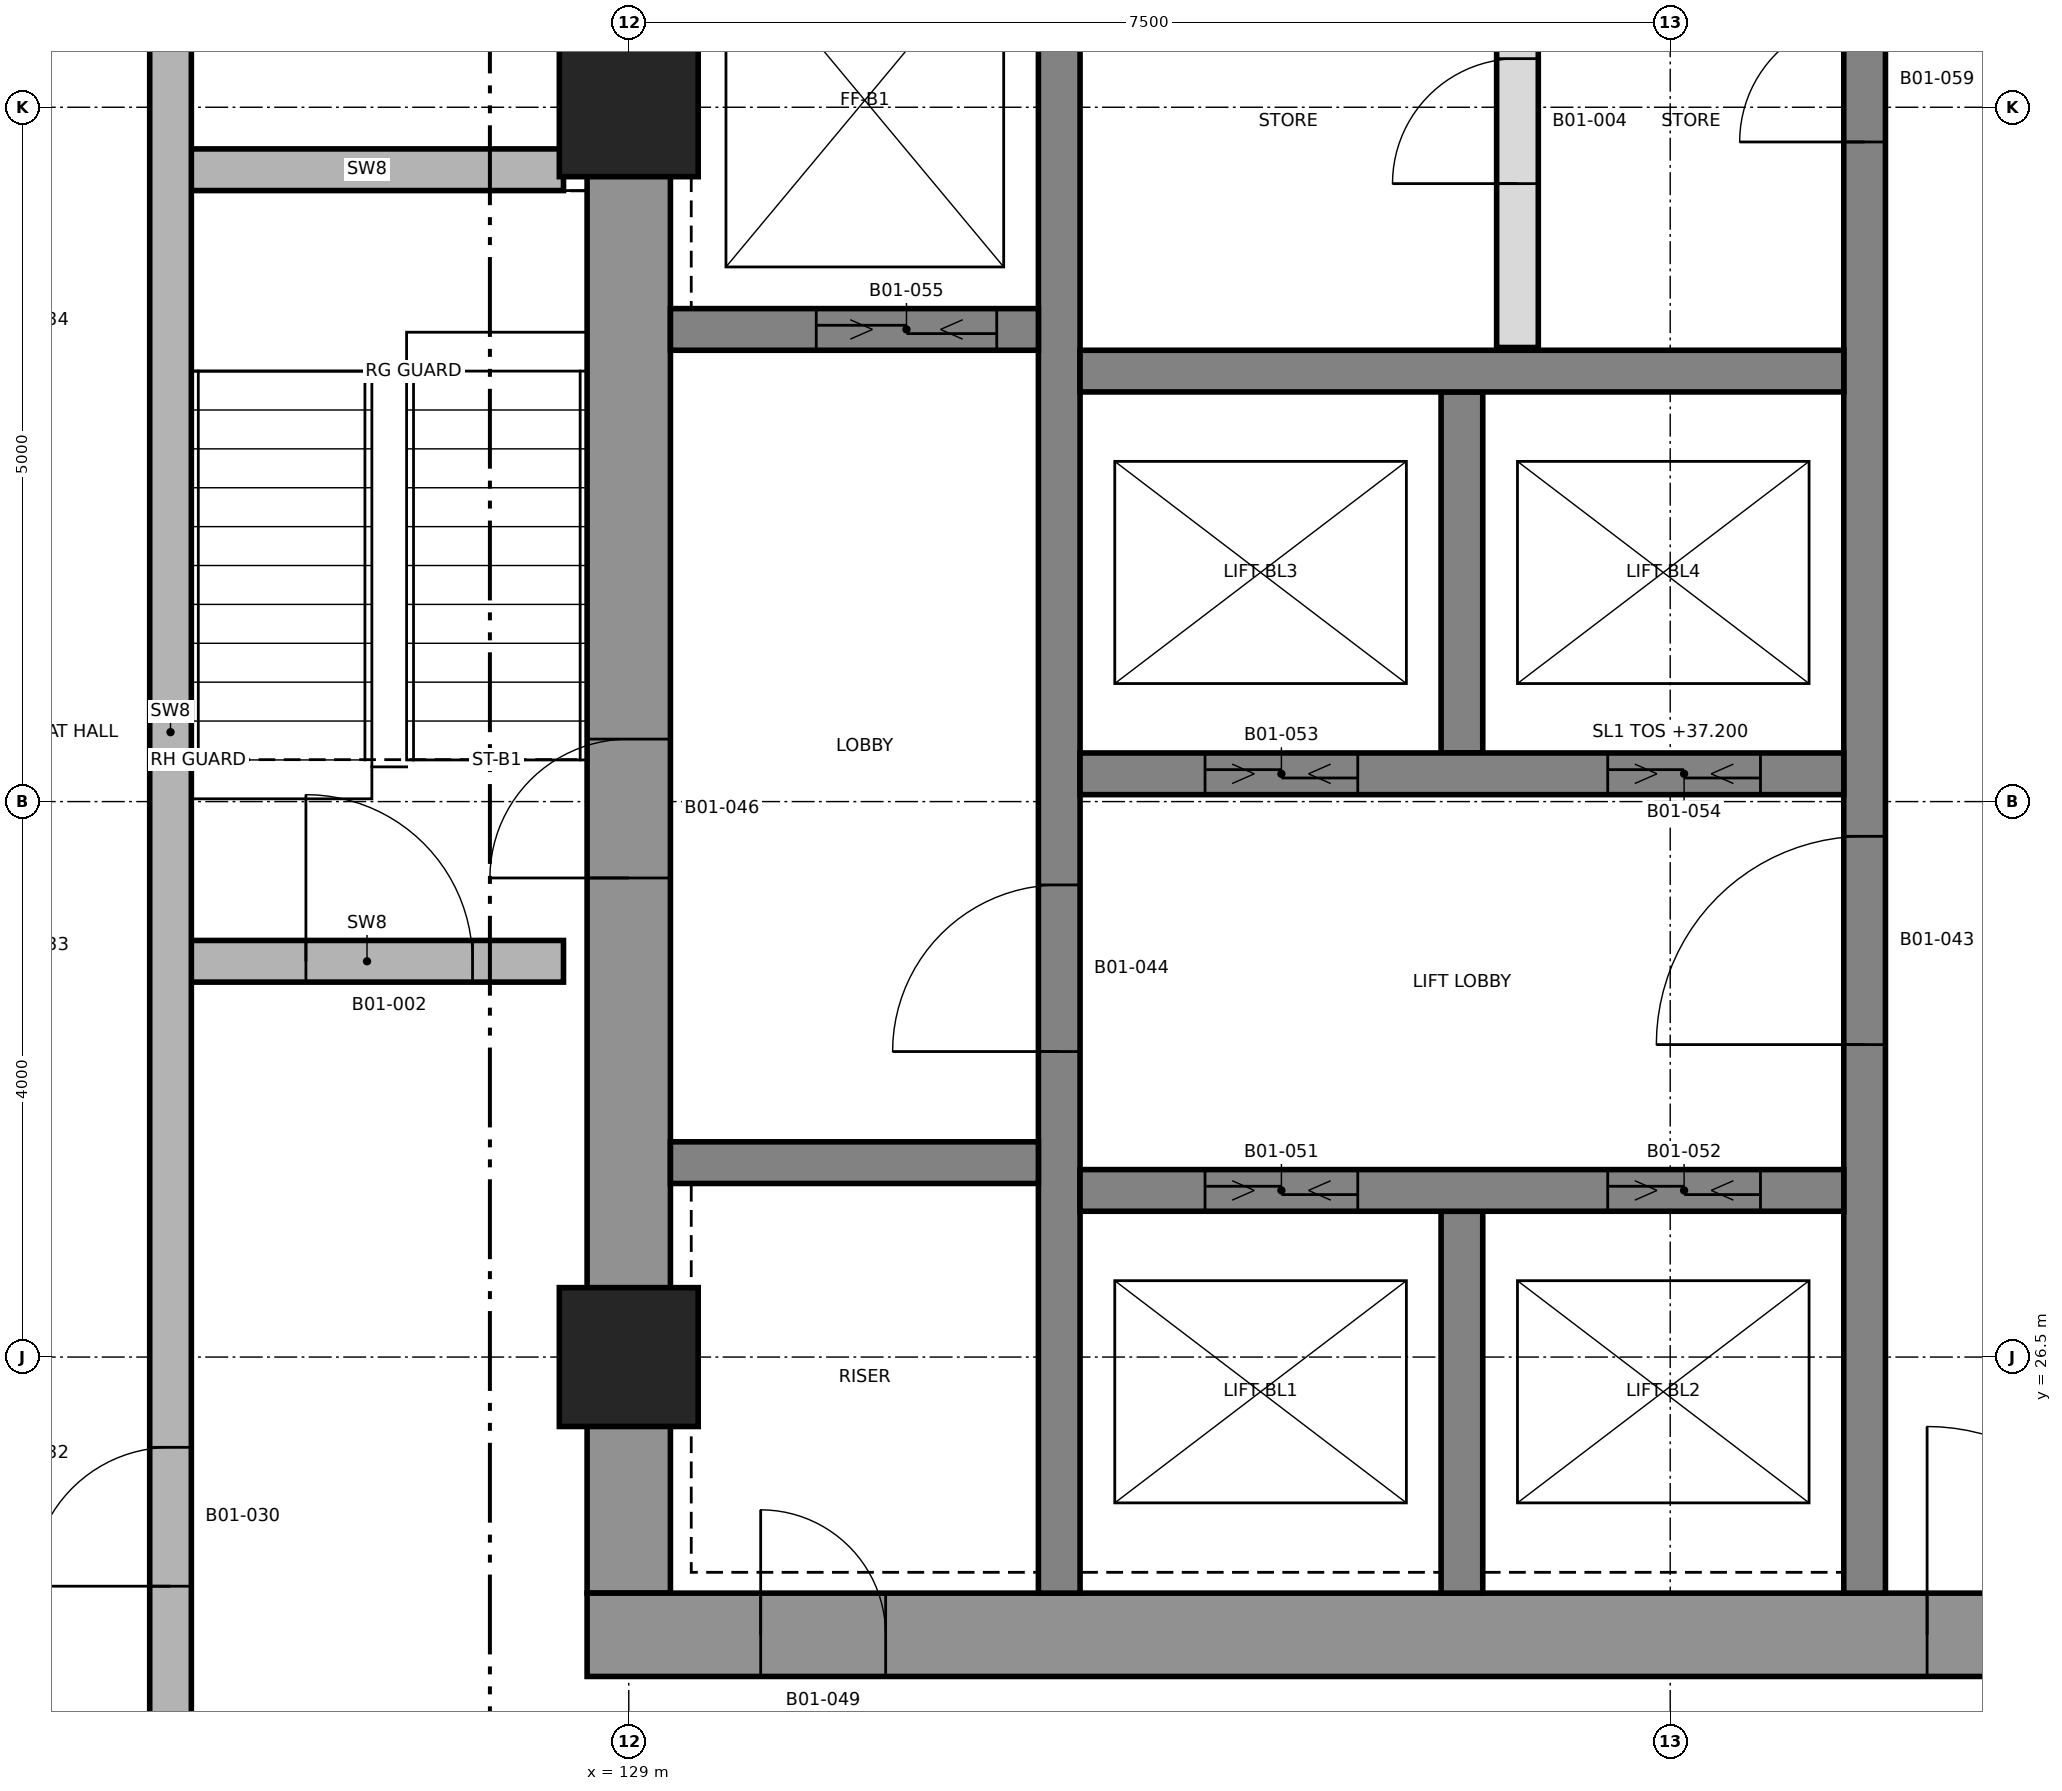
"""IFC4 building model, lengths in metres.
Left out: names, types, materials, properties, quantities, classifications, styles, units other than length and angle.
Written with IfcOpenShell. Run it as: python <this file> out.ifc"""

import sys

from ifc_helpers import new_model, si_unit, direction, frame, frame_2d, origin, origin_2d, place, context, subcontext, project, spatial, rectangle, extrude, element, fill, save


model = new_model("IFC4")
c1 = context("Model", 3, precision=1e-05, world=origin(), true_north=direction((0.0, 1.0)))
c2 = subcontext(c1, "Body", "Model", "MODEL_VIEW")
j1 = project(units=[si_unit("LENGTHUNIT", "METRE"), si_unit("PLANEANGLEUNIT", "RADIAN")], contexts=[c1])
p1 = place(None, origin())
s1 = spatial("IfcSite", under=j1, at=p1, CompositionType="ELEMENT")
p2 = place(p1, origin())
s2 = spatial("IfcBuilding", under=s1, at=p2, CompositionType="ELEMENT")
p3 = place(p2, frame((0.0, 0.0, 37.2)))
s3 = spatial("IfcBuildingStorey", under=s2, at=p3, CompositionType="ELEMENT", Elevation=37.2)
p4 = place(p3, frame((129.0, 24.8, 0.0), z_axis=(0.0, 0.0, 1.0), x_axis=(0.0, 1.0, 0.0)))
e1 = element("IfcWall", 1, at=p4, inside=s3, PredefinedType="SHEAR", context=c2, shape_type="SweptSolid", body=[
    extrude(rectangle(XDim=12.4, YDim=0.6, at=frame_2d((6.2, 0.0))), origin(), (0.0, 0.0, 1.0), 3.7),
])
p5 = place(p4, frame((5.15, 0.0, 0.0)))
e2 = element("IfcOpeningElement", 2, at=p5, cuts=e1, PredefinedType="OPENING", context=c2, shape_type="SweptSolid", body=[
    extrude(rectangle(XDim=1.0, YDim=2.1, at=frame_2d((0.5, 1.05))), frame((0.0, 0.31, 0.0), z_axis=(0.0, -1.0, 0.0), x_axis=(1.0, 0.0, 0.0)), (0.0, 0.0, 1.0), 0.62),
])
p6 = place(p3, frame((128.7, 24.5, 0.0), z_axis=(0.0, 0.0, 1.0), x_axis=(1.0, 0.0, 0.0)))
e3 = element("IfcWall", 3, at=p6, inside=s3, PredefinedType="SHEAR", context=c2, shape_type="SweptSolid", body=[
    extrude(rectangle(XDim=15.0, YDim=0.6, at=frame_2d((7.5, 0.0))), origin(), (0.0, 0.0, 1.0), 3.7),
])
p7 = place(p6, frame((9.65, 0.0, 0.0)))
e4 = element("IfcOpeningElement", 4, at=p7, cuts=e3, PredefinedType="OPENING", context=c2, shape_type="SweptSolid", body=[
    extrude(rectangle(XDim=1.5, YDim=2.1, at=frame_2d((0.75, 1.05))), frame((0.0, 0.31, 0.0), z_axis=(0.0, -1.0, 0.0), x_axis=(1.0, 0.0, 0.0)), (0.0, 0.0, 1.0), 0.62),
])
p8 = place(p6, frame((1.25, 0.0, 0.0)))
e5 = element("IfcOpeningElement", 5, at=p8, cuts=e3, PredefinedType="OPENING", context=c2, shape_type="SweptSolid", body=[
    extrude(rectangle(XDim=0.9, YDim=2.1, at=frame_2d((0.45, 1.05))), frame((0.0, 0.31, 0.0), z_axis=(0.0, -1.0, 0.0), x_axis=(1.0, 0.0, 0.0)), (0.0, 0.0, 1.0), 0.62),
])
p9 = place(p3, frame((132.1, 24.8, 0.0), z_axis=(0.0, 0.0, 1.0), x_axis=(0.0, 1.0, 0.0)))
e6 = element("IfcWall", 6, at=p9, inside=s3, PredefinedType="SHEAR", context=c2, shape_type="SweptSolid", body=[
    extrude(rectangle(XDim=12.4, YDim=0.3, at=frame_2d((6.2, 0.0))), origin(), (0.0, 0.0, 1.0), 3.7),
])
p10 = place(p9, frame((3.9, 0.0, 0.0)))
e7 = element("IfcOpeningElement", 7, at=p10, cuts=e6, PredefinedType="OPENING", context=c2, shape_type="SweptSolid", body=[
    extrude(rectangle(XDim=1.2, YDim=2.1, at=frame_2d((0.6, 1.05))), frame((0.0, 0.16, 0.0), z_axis=(0.0, -1.0, 0.0), x_axis=(1.0, 0.0, 0.0)), (0.0, 0.0, 1.0), 0.32),
])
p11 = place(p3, frame((137.9, 24.8, 0.0), z_axis=(0.0, 0.0, 1.0), x_axis=(0.0, 1.0, 0.0)))
e8 = element("IfcWall", 8, at=p11, inside=s3, PredefinedType="SHEAR", context=c2, shape_type="SweptSolid", body=[
    extrude(rectangle(XDim=12.4, YDim=0.3, at=frame_2d((6.2, 0.0))), origin(), (0.0, 0.0, 1.0), 3.7),
])
p12 = place(p11, frame((3.95, 0.0, 0.0)))
e9 = element("IfcOpeningElement", 9, at=p12, cuts=e8, PredefinedType="OPENING", context=c2, shape_type="SweptSolid", body=[
    extrude(rectangle(XDim=1.5, YDim=2.1, at=frame_2d((0.75, 1.05))), frame((0.0, 0.16, 0.0), z_axis=(0.0, -1.0, 0.0), x_axis=(1.0, 0.0, 0.0)), (0.0, 0.0, 1.0), 0.32),
])
p13 = place(p11, frame((10.45, 0.0, 0.0)))
e10 = element("IfcOpeningElement", 10, at=p13, cuts=e8, PredefinedType="OPENING", context=c2, shape_type="SweptSolid", body=[
    extrude(rectangle(XDim=0.9, YDim=2.1, at=frame_2d((0.45, 1.05))), frame((0.0, 0.16, 0.0), z_axis=(0.0, -1.0, 0.0), x_axis=(1.0, 0.0, 0.0)), (0.0, 0.0, 1.0), 0.32),
])
p14 = place(p3, frame((135.0, 24.8, 0.0), z_axis=(0.0, 0.0, 1.0), x_axis=(0.0, 1.0, 0.0)))
e11 = element("IfcWall", 11, at=p14, inside=s3, PredefinedType="SHEAR", context=c2, shape_type="SweptSolid", body=[
    extrude(rectangle(XDim=2.75, YDim=0.3, at=frame_2d((1.375, 0.0))), origin(), (0.0, 0.0, 1.0), 3.7),
])
p15 = place(p3, frame((135.0, 30.85, 0.0), z_axis=(0.0, 0.0, 1.0), x_axis=(0.0, 1.0, 0.0)))
e12 = element("IfcWall", 12, at=p15, inside=s3, PredefinedType="SHEAR", context=c2, shape_type="SweptSolid", body=[
    extrude(rectangle(XDim=2.6, YDim=0.3, at=frame_2d((1.3, 0.0))), origin(), (0.0, 0.0, 1.0), 3.7),
])
p16 = place(p3, frame((132.25, 27.7, 0.0), z_axis=(0.0, 0.0, 1.0), x_axis=(1.0, 0.0, 0.0)))
e13 = element("IfcWall", 13, at=p16, inside=s3, PredefinedType="SHEAR", context=c2, shape_type="SweptSolid", body=[
    extrude(rectangle(XDim=5.5, YDim=0.3, at=frame_2d((2.75, 0.0))), origin(), (0.0, 0.0, 1.0), 3.7),
])
p17 = place(p16, frame((0.9, 0.0, 0.0)))
e14 = element("IfcOpeningElement", 14, at=p17, cuts=e13, PredefinedType="OPENING", context=c2, shape_type="SweptSolid", body=[
    extrude(rectangle(XDim=1.1, YDim=2.4, at=frame_2d((0.55, 1.2))), frame((0.0, 0.16, 0.0), z_axis=(0.0, -1.0, 0.0), x_axis=(1.0, 0.0, 0.0)), (0.0, 0.0, 1.0), 0.32),
])
p18 = place(p16, frame((3.8, 0.0, 0.0)))
e15 = element("IfcOpeningElement", 15, at=p18, cuts=e13, PredefinedType="OPENING", context=c2, shape_type="SweptSolid", body=[
    extrude(rectangle(XDim=1.1, YDim=2.4, at=frame_2d((0.55, 1.2))), frame((0.0, 0.16, 0.0), z_axis=(0.0, -1.0, 0.0), x_axis=(1.0, 0.0, 0.0)), (0.0, 0.0, 1.0), 0.32),
])
p19 = place(p3, frame((132.25, 30.7, 0.0), z_axis=(0.0, 0.0, 1.0), x_axis=(1.0, 0.0, 0.0)))
e16 = element("IfcWall", 16, at=p19, inside=s3, PredefinedType="SHEAR", context=c2, shape_type="SweptSolid", body=[
    extrude(rectangle(XDim=5.5, YDim=0.3, at=frame_2d((2.75, 0.0))), origin(), (0.0, 0.0, 1.0), 3.7),
])
p20 = place(p19, frame((0.9, 0.0, 0.0)))
e17 = element("IfcOpeningElement", 17, at=p20, cuts=e16, PredefinedType="OPENING", context=c2, shape_type="SweptSolid", body=[
    extrude(rectangle(XDim=1.1, YDim=2.4, at=frame_2d((0.55, 1.2))), frame((0.0, 0.16, 0.0), z_axis=(0.0, -1.0, 0.0), x_axis=(1.0, 0.0, 0.0)), (0.0, 0.0, 1.0), 0.32),
])
p21 = place(p19, frame((3.8, 0.0, 0.0)))
e18 = element("IfcOpeningElement", 18, at=p21, cuts=e16, PredefinedType="OPENING", context=c2, shape_type="SweptSolid", body=[
    extrude(rectangle(XDim=1.1, YDim=2.4, at=frame_2d((0.55, 1.2))), frame((0.0, 0.16, 0.0), z_axis=(0.0, -1.0, 0.0), x_axis=(1.0, 0.0, 0.0)), (0.0, 0.0, 1.0), 0.32),
])
p22 = place(p3, frame((132.25, 33.6, 0.0), z_axis=(0.0, 0.0, 1.0), x_axis=(1.0, 0.0, 0.0)))
e19 = element("IfcWall", 19, at=p22, inside=s3, PredefinedType="SHEAR", context=c2, shape_type="SweptSolid", body=[
    extrude(rectangle(XDim=5.5, YDim=0.3, at=frame_2d((2.75, 0.0))), origin(), (0.0, 0.0, 1.0), 3.7),
])
p23 = place(p3, frame((129.3, 27.9, 0.0), z_axis=(0.0, 0.0, 1.0), x_axis=(1.0, 0.0, 0.0)))
e20 = element("IfcWall", 20, at=p23, inside=s3, PredefinedType="SHEAR", context=c2, shape_type="SweptSolid", body=[
    extrude(rectangle(XDim=2.65, YDim=0.3, at=frame_2d((1.325, 0.0))), origin(), (0.0, 0.0, 1.0), 3.7),
])
p24 = place(p3, frame((129.3, 33.9, 0.0), z_axis=(0.0, 0.0, 1.0), x_axis=(1.0, 0.0, 0.0)))
e21 = element("IfcWall", 21, at=p24, inside=s3, PredefinedType="SHEAR", context=c2, shape_type="SweptSolid", body=[
    extrude(rectangle(XDim=2.65, YDim=0.3, at=frame_2d((1.325, 0.0))), origin(), (0.0, 0.0, 1.0), 3.7),
])
p25 = place(p24, frame((1.05, 0.0, 0.0)))
e22 = element("IfcOpeningElement", 22, at=p25, cuts=e21, PredefinedType="OPENING", context=c2, shape_type="SweptSolid", body=[
    extrude(rectangle(XDim=1.3, YDim=2.4, at=frame_2d((0.65, 1.2))), frame((0.0, 0.16, 0.0), z_axis=(0.0, -1.0, 0.0), x_axis=(1.0, 0.0, 0.0)), (0.0, 0.0, 1.0), 0.32),
])
for number, where, z_axis, x_axis in (
    (23, (129.0, 26.5, 0.0), (0.0, 0.0, 1.0), (1.0, 0.0, 0.0)),
    (24, (129.0, 35.5, 0.0), (0.0, 0.0, 1.0), (1.0, 0.0, 0.0)),
):
    element("IfcColumn", number, at=place(p3, frame(where, z_axis=z_axis, x_axis=x_axis)), inside=s3, PredefinedType="COLUMN", context=c2, shape_type="SweptSolid", body=[
        extrude(rectangle(XDim=1.0, YDim=1.0, at=origin_2d()), origin(), (0.0, 0.0, 1.0), 3.7),
    ])
p26 = place(p3, frame((125.7, 29.35, 0.0), z_axis=(0.0, 0.0, 1.0), x_axis=(1.0, 0.0, 0.0)))
e25 = element("IfcWall", 25, at=p26, inside=s3, PredefinedType="SHEAR", context=c2, shape_type="SweptSolid", body=[
    extrude(rectangle(XDim=2.83, YDim=0.3, at=frame_2d((1.415, 0.0))), origin(), (0.0, 0.0, 1.0), 3.4),
])
p27 = place(p26, frame((0.975, 0.0, 0.0)))
e26 = element("IfcOpeningElement", 26, at=p27, cuts=e25, PredefinedType="OPENING", context=c2, shape_type="SweptSolid", body=[
    extrude(rectangle(XDim=1.2, YDim=2.1, at=frame_2d((0.6, 1.05))), frame((0.0, 0.16, 0.0), z_axis=(0.0, -1.0, 0.0), x_axis=(1.0, 0.0, 0.0)), (0.0, 0.0, 1.0), 0.32),
])
p28 = place(p3, frame((125.7, 35.05, 0.0), z_axis=(0.0, 0.0, 1.0), x_axis=(1.0, 0.0, 0.0)))
e27 = element("IfcWall", 27, at=p28, inside=s3, PredefinedType="SHEAR", context=c2, shape_type="SweptSolid", body=[
    extrude(rectangle(XDim=2.83, YDim=0.3, at=frame_2d((1.415, 0.0))), origin(), (0.0, 0.0, 1.0), 3.4),
])
p29 = place(p3, frame((125.7, 22.15, 0.0), z_axis=(0.0, 0.0, 1.0), x_axis=(0.0, 1.0, 0.0)))
e28 = element("IfcWall", 28, at=p29, inside=s3, PredefinedType="SHEAR", context=c2, shape_type="SweptSolid", body=[
    extrude(rectangle(XDim=17.7, YDim=0.3, at=frame_2d((8.85, 0.0))), origin(), (0.0, 0.0, 1.0), 3.4),
])
p30 = place(p29, frame((2.7, 0.0, 0.0)))
e29 = element("IfcOpeningElement", 29, at=p30, cuts=e28, PredefinedType="OPENING", context=c2, shape_type="SweptSolid", body=[
    extrude(rectangle(XDim=1.0, YDim=2.1, at=frame_2d((0.5, 1.05))), frame((0.0, 0.16, 0.0), z_axis=(0.0, -1.0, 0.0), x_axis=(1.0, 0.0, 0.0)), (0.0, 0.0, 1.0), 0.32),
])
p31 = place(p3, frame((135.4, 33.77, 0.0), z_axis=(0.0, 0.0, 1.0), x_axis=(0.0, 1.0, 0.0)))
e30 = element("IfcWall", 30, at=p31, inside=s3, PredefinedType="PARTITIONING", context=c2, shape_type="SweptSolid", body=[
    extrude(rectangle(XDim=3.26, YDim=0.3, at=frame_2d((1.63, 0.0))), origin(), (0.0, 0.0, 1.0), 3.4),
])
p32 = place(p31, frame((1.18, 0.0, 0.0)))
e31 = element("IfcOpeningElement", 31, at=p32, cuts=e30, PredefinedType="OPENING", context=c2, shape_type="SweptSolid", body=[
    extrude(rectangle(XDim=0.9, YDim=2.1, at=frame_2d((0.45, 1.05))), frame((0.0, 0.16, 0.0), z_axis=(0.0, -1.0, 0.0), x_axis=(1.0, 0.0, 0.0)), (0.0, 0.0, 1.0), 0.32),
])
p33 = place(p27, origin())
e32 = element("IfcDoor", 32, at=p33, inside=s3, OperationType="SINGLE_SWING_RIGHT", PredefinedType="DOOR", context=c2, shape_type="SweptSolid", body=[
    extrude(rectangle(XDim=1.2, YDim=2.1, at=frame_2d((0.6, 1.05))), frame((0.0, 0.025, 0.0), z_axis=(0.0, -1.0, 0.0), x_axis=(1.0, 0.0, 0.0)), (0.0, 0.0, 1.0), 0.05),
])
fill(e26, e32)
p34 = place(p32, origin())
e33 = element("IfcDoor", 33, at=p34, inside=s3, OperationType="SINGLE_SWING_RIGHT", PredefinedType="DOOR", context=c2, shape_type="SweptSolid", body=[
    extrude(rectangle(XDim=0.9, YDim=2.1, at=frame_2d((0.45, 1.05))), frame((0.0, 0.025, 0.0), z_axis=(0.0, -1.0, 0.0), x_axis=(1.0, 0.0, 0.0)), (0.0, 0.0, 1.0), 0.05),
])
fill(e31, e33)
p35 = place(p30, origin())
e34 = element("IfcDoor", 34, at=p35, inside=s3, OperationType="SINGLE_SWING_RIGHT", PredefinedType="DOOR", context=c2, shape_type="SweptSolid", body=[
    extrude(rectangle(XDim=1.0, YDim=2.1, at=frame_2d((0.5, 1.05))), frame((0.0, 0.025, 0.0), z_axis=(0.0, -1.0, 0.0), x_axis=(1.0, 0.0, 0.0)), (0.0, 0.0, 1.0), 0.05),
])
fill(e29, e34)
p36 = place(p12, origin())
e35 = element("IfcDoor", 35, at=p36, inside=s3, OperationType="SINGLE_SWING_RIGHT", PredefinedType="DOOR", context=c2, shape_type="SweptSolid", body=[
    extrude(rectangle(XDim=1.5, YDim=2.1, at=frame_2d((0.75, 1.05))), frame((0.0, 0.025, 0.0), z_axis=(0.0, -1.0, 0.0), x_axis=(1.0, 0.0, 0.0)), (0.0, 0.0, 1.0), 0.05),
])
fill(e9, e35)
p37 = place(p10, origin())
e36 = element("IfcDoor", 36, at=p37, inside=s3, OperationType="SINGLE_SWING_LEFT", PredefinedType="DOOR", context=c2, shape_type="SweptSolid", body=[
    extrude(rectangle(XDim=1.2, YDim=2.1, at=frame_2d((0.6, 1.05))), frame((0.0, 0.025, 0.0), z_axis=(0.0, -1.0, 0.0), x_axis=(1.0, 0.0, 0.0)), (0.0, 0.0, 1.0), 0.05),
])
fill(e7, e36)
p38 = place(p5, origin())
e37 = element("IfcDoor", 37, at=p38, inside=s3, OperationType="SINGLE_SWING_RIGHT", PredefinedType="DOOR", context=c2, shape_type="SweptSolid", body=[
    extrude(rectangle(XDim=1.0, YDim=2.1, at=frame_2d((0.5, 1.05))), frame((0.0, 0.025, 0.0), z_axis=(0.0, -1.0, 0.0), x_axis=(1.0, 0.0, 0.0)), (0.0, 0.0, 1.0), 0.05),
])
fill(e2, e37)
p39 = place(p7, origin())
e38 = element("IfcDoor", 38, at=p39, inside=s3, OperationType="SINGLE_SWING_LEFT", PredefinedType="DOOR", context=c2, shape_type="SweptSolid", body=[
    extrude(rectangle(XDim=1.5, YDim=2.1, at=frame_2d((0.75, 1.05))), frame((0.0, 0.025, 0.0), z_axis=(0.0, -1.0, 0.0), x_axis=(1.0, 0.0, 0.0)), (0.0, 0.0, 1.0), 0.05),
])
fill(e4, e38)
p40 = place(p8, origin())
e39 = element("IfcDoor", 39, at=p40, inside=s3, OperationType="SINGLE_SWING_LEFT", PredefinedType="DOOR", context=c2, shape_type="SweptSolid", body=[
    extrude(rectangle(XDim=0.9, YDim=2.1, at=frame_2d((0.45, 1.05))), frame((0.0, 0.025, 0.0), z_axis=(0.0, -1.0, 0.0), x_axis=(1.0, 0.0, 0.0)), (0.0, 0.0, 1.0), 0.05),
])
fill(e5, e39)
p41 = place(p17, origin())
e40 = element("IfcDoor", 40, at=p41, inside=s3, OperationType="SLIDING_TO_LEFT", PredefinedType="DOOR", context=c2, shape_type="SweptSolid", body=[
    extrude(rectangle(XDim=1.1, YDim=2.4, at=frame_2d((0.55, 1.2))), frame((0.0, 0.025, 0.0), z_axis=(0.0, -1.0, 0.0), x_axis=(1.0, 0.0, 0.0)), (0.0, 0.0, 1.0), 0.05),
])
fill(e14, e40)
p42 = place(p18, origin())
e41 = element("IfcDoor", 41, at=p42, inside=s3, OperationType="SLIDING_TO_LEFT", PredefinedType="DOOR", context=c2, shape_type="SweptSolid", body=[
    extrude(rectangle(XDim=1.1, YDim=2.4, at=frame_2d((0.55, 1.2))), frame((0.0, 0.025, 0.0), z_axis=(0.0, -1.0, 0.0), x_axis=(1.0, 0.0, 0.0)), (0.0, 0.0, 1.0), 0.05),
])
fill(e15, e41)
p43 = place(p20, origin())
e42 = element("IfcDoor", 42, at=p43, inside=s3, OperationType="SLIDING_TO_LEFT", PredefinedType="DOOR", context=c2, shape_type="SweptSolid", body=[
    extrude(rectangle(XDim=1.1, YDim=2.4, at=frame_2d((0.55, 1.2))), frame((0.0, 0.025, 0.0), z_axis=(0.0, -1.0, 0.0), x_axis=(1.0, 0.0, 0.0)), (0.0, 0.0, 1.0), 0.05),
])
fill(e17, e42)
p44 = place(p21, origin())
e43 = element("IfcDoor", 43, at=p44, inside=s3, OperationType="SLIDING_TO_LEFT", PredefinedType="DOOR", context=c2, shape_type="SweptSolid", body=[
    extrude(rectangle(XDim=1.1, YDim=2.4, at=frame_2d((0.55, 1.2))), frame((0.0, 0.025, 0.0), z_axis=(0.0, -1.0, 0.0), x_axis=(1.0, 0.0, 0.0)), (0.0, 0.0, 1.0), 0.05),
])
fill(e18, e43)
p45 = place(p25, origin())
e44 = element("IfcDoor", 44, at=p45, inside=s3, OperationType="SLIDING_TO_LEFT", PredefinedType="DOOR", context=c2, shape_type="SweptSolid", body=[
    extrude(rectangle(XDim=1.3, YDim=2.4, at=frame_2d((0.65, 1.2))), frame((0.0, 0.025, 0.0), z_axis=(0.0, -1.0, 0.0), x_axis=(1.0, 0.0, 0.0)), (0.0, 0.0, 1.0), 0.05),
])
fill(e22, e44)
p46 = place(p13, origin())
e45 = element("IfcDoor", 45, at=p46, inside=s3, OperationType="SINGLE_SWING_RIGHT", PredefinedType="DOOR", context=c2, shape_type="SweptSolid", body=[
    extrude(rectangle(XDim=0.9, YDim=2.1, at=frame_2d((0.45, 1.05))), frame((0.0, 0.025, 0.0), z_axis=(0.0, -1.0, 0.0), x_axis=(1.0, 0.0, 0.0)), (0.0, 0.0, 1.0), 0.05),
])
fill(e10, e45)
save(model, sys.argv[1])
